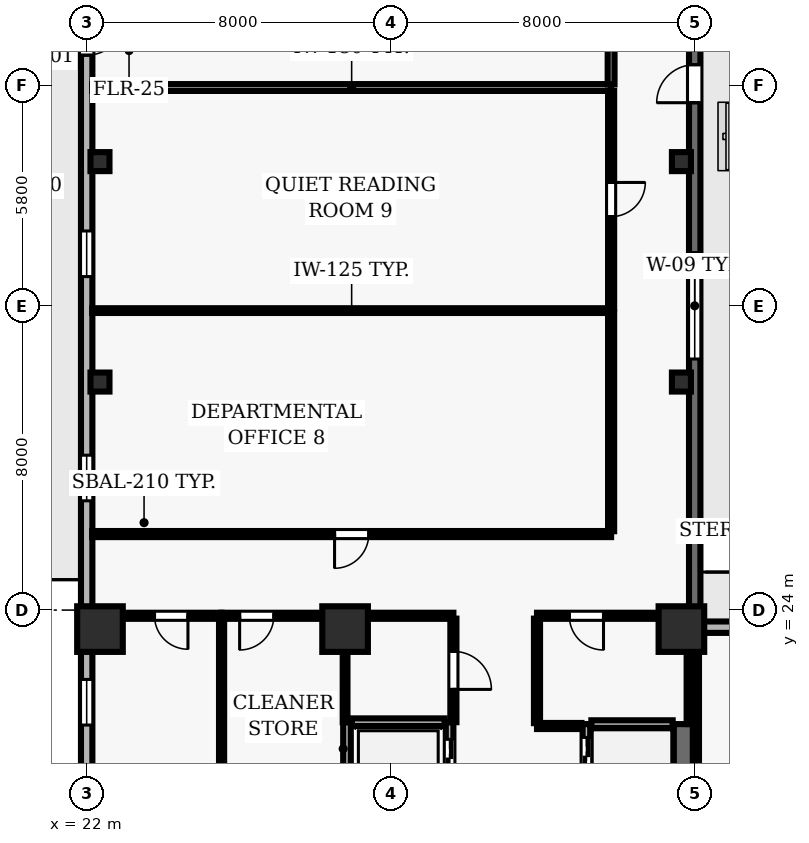
"""IFC4 building model, lengths in metres.
Left out: names, types, materials, properties, quantities, classifications, styles, units other than length and angle.
Written with IfcOpenShell. Run it as: python <this file> out.ifc"""

import sys

from ifc_helpers import new_model, si_unit, direction, frame, frame_2d, origin, origin_2d, place, context, subcontext, project, spatial, rectangle, hollow_rectangle, extrude, element, fill, save


model = new_model("IFC4")
c1 = context("Model", 3, precision=1e-05, world=origin(), true_north=direction((0.0, 1.0)))
c2 = subcontext(c1, "Body", "Model", "MODEL_VIEW")
j1 = project(units=[si_unit("LENGTHUNIT", "METRE"), si_unit("PLANEANGLEUNIT", "RADIAN")], contexts=[c1])
p1 = place(None, origin())
s1 = spatial("IfcSite", under=j1, at=p1, CompositionType="ELEMENT")
p2 = place(p1, origin())
s2 = spatial("IfcBuilding", under=s1, at=p2, CompositionType="ELEMENT")
p3 = place(p2, frame((0.0, 0.0, 150.2)))
s3 = spatial("IfcBuildingStorey", under=s2, at=p3, CompositionType="ELEMENT", Elevation=150.2)
for number, where, z_axis, x_axis in (
    (1, (22.35, 23.5, 0.0), (0.0, 0.0, 1.0), (1.0, 0.0, 0.0)),
    (2, (28.8, 23.5, 0.0), (0.0, 0.0, 1.0), (1.0, 0.0, 0.0)),
    (3, (37.65, 23.5, 0.0), (0.0, 0.0, 1.0), (1.0, 0.0, 0.0)),
):
    element("IfcColumn", number, at=place(p3, frame(where, z_axis=z_axis, x_axis=x_axis)), inside=s3, PredefinedType="COLUMN", context=c2, shape_type="SweptSolid", body=[
        extrude(rectangle(XDim=1.2, YDim=1.2, at=origin_2d()), origin(), (0.0, 0.0, 1.0), 3.9),
    ])
for number, where, z_axis, x_axis in (
    (4, (22.35, 30.0, 0.0), (0.0, 0.0, 1.0), (1.0, 0.0, 0.0)),
    (5, (37.65, 30.0, 0.0), (0.0, 0.0, 1.0), (1.0, 0.0, 0.0)),
    (6, (22.35, 35.8, 0.0), (0.0, 0.0, 1.0), (1.0, 0.0, 0.0)),
    (7, (37.65, 35.8, 0.0), (0.0, 0.0, 1.0), (1.0, 0.0, 0.0)),
):
    element("IfcColumn", number, at=place(p3, frame(where, z_axis=z_axis, x_axis=x_axis)), inside=s3, PredefinedType="COLUMN", context=c2, shape_type="SweptSolid", body=[
        extrude(hollow_rectangle(XDim=0.5, YDim=0.5, WallThickness=0.025, at=origin_2d()), origin(), (0.0, 0.0, 1.0), 3.9),
    ])
p4 = place(p3, frame((44.194, 23.55, 0.0), z_axis=(0.0, 0.0, 1.0), x_axis=(-1.0, 0.0, 0.0)))
e8 = element("IfcWall", 8, at=p4, inside=s3, PredefinedType="SOLIDWALL", context=c2, shape_type="SweptSolid", body=[
    extrude(rectangle(XDim=6.194, YDim=0.3, at=frame_2d((3.097, 0.0))), origin(), (0.0, 0.0, 1.0), 3.69),
])
p5 = place(p4, frame((2.422, 0.0, 0.0)))
e9 = element("IfcOpeningElement", 9, at=p5, cuts=e8, PredefinedType="OPENING", context=c2, shape_type="SweptSolid", body=[
    extrude(rectangle(XDim=1.35, YDim=2.2, at=frame_2d((0.675, 1.1))), frame((0.0, 0.16, 0.0), z_axis=(0.0, -1.0, 0.0), x_axis=(1.0, 0.0, 0.0)), (0.0, 0.0, 1.0), 0.32),
])
p6 = place(p3, frame((38.0, 23.55, 0.0), z_axis=(0.0, 0.0, 1.0), x_axis=(0.0, 1.0, 0.0)))
e10 = element("IfcWall", 10, at=p6, inside=s3, PredefinedType="SOLIDWALL", context=c2, shape_type="SweptSolid", body=[
    extrude(rectangle(XDim=22.55, YDim=0.3, at=frame_2d((11.275, 0.0))), origin(), (0.0, 0.0, 1.0), 3.69),
])
p7 = place(p6, frame((13.8, 0.0, 0.0)))
e11 = element("IfcOpeningElement", 11, at=p7, cuts=e10, PredefinedType="OPENING", context=c2, shape_type="SweptSolid", body=[
    extrude(rectangle(XDim=1.0, YDim=2.2, at=frame_2d((0.5, 1.1))), frame((0.0, 0.16, 0.0), z_axis=(0.0, -1.0, 0.0), x_axis=(1.0, 0.0, 0.0)), (0.0, 0.0, 1.0), 0.32),
])
p8 = place(p6, frame((7.056, 0.0, 0.9)))
e12 = element("IfcOpeningElement", 12, at=p8, cuts=e10, PredefinedType="OPENING", context=c2, shape_type="SweptSolid", body=[
    extrude(rectangle(XDim=2.8, YDim=1.8, at=frame_2d((1.4, 0.9))), frame((0.0, 0.16, 0.0), z_axis=(0.0, -1.0, 0.0), x_axis=(1.0, 0.0, 0.0)), (0.0, 0.0, 1.0), 0.32),
])
p9 = place(p6, frame((18.331, 0.0, 0.9)))
e13 = element("IfcOpeningElement", 13, at=p9, cuts=e10, PredefinedType="OPENING", context=c2, shape_type="SweptSolid", body=[
    extrude(rectangle(XDim=2.8, YDim=1.8, at=frame_2d((1.4, 0.9))), frame((0.0, 0.16, 0.0), z_axis=(0.0, -1.0, 0.0), x_axis=(1.0, 0.0, 0.0)), (0.0, 0.0, 1.0), 0.32),
])
p10 = place(p3, frame((22.0, 46.1, 0.0), z_axis=(0.0, 0.0, 1.0), x_axis=(0.0, -1.0, 0.0)))
e14 = element("IfcWall", 14, at=p10, inside=s3, PredefinedType="SOLIDWALL", context=c2, shape_type="SweptSolid", body=[
    extrude(rectangle(XDim=43.6, YDim=0.3, at=frame_2d((21.8, 0.0))), origin(), (0.0, 0.0, 1.0), 3.69),
])
p11 = place(p10, frame((6.5, 0.0, 0.0)))
e15 = element("IfcOpeningElement", 15, at=p11, cuts=e14, PredefinedType="OPENING", context=c2, shape_type="SweptSolid", body=[
    extrude(rectangle(XDim=1.0, YDim=2.2, at=frame_2d((0.5, 1.1))), frame((0.0, 0.16, 0.0), z_axis=(0.0, -1.0, 0.0), x_axis=(1.0, 0.0, 0.0)), (0.0, 0.0, 1.0), 0.32),
])
p12 = place(p10, frame((12.125, 0.0, 0.9)))
e16 = element("IfcOpeningElement", 16, at=p12, cuts=e14, PredefinedType="OPENING", context=c2, shape_type="SweptSolid", body=[
    extrude(rectangle(XDim=1.2, YDim=1.6, at=frame_2d((0.6, 0.8))), frame((0.0, 0.16, 0.0), z_axis=(0.0, -1.0, 0.0), x_axis=(1.0, 0.0, 0.0)), (0.0, 0.0, 1.0), 0.32),
])
p13 = place(p10, frame((18.025, 0.0, 0.9)))
e17 = element("IfcOpeningElement", 17, at=p13, cuts=e14, PredefinedType="OPENING", context=c2, shape_type="SweptSolid", body=[
    extrude(rectangle(XDim=1.2, YDim=1.6, at=frame_2d((0.6, 0.8))), frame((0.0, 0.16, 0.0), z_axis=(0.0, -1.0, 0.0), x_axis=(1.0, 0.0, 0.0)), (0.0, 0.0, 1.0), 0.32),
])
p14 = place(p10, frame((23.925, 0.0, 0.9)))
e18 = element("IfcOpeningElement", 18, at=p14, cuts=e14, PredefinedType="OPENING", context=c2, shape_type="SweptSolid", body=[
    extrude(rectangle(XDim=1.2, YDim=1.6, at=frame_2d((0.6, 0.8))), frame((0.0, 0.16, 0.0), z_axis=(0.0, -1.0, 0.0), x_axis=(1.0, 0.0, 0.0)), (0.0, 0.0, 1.0), 0.32),
])
p15 = place(p10, frame((29.375, 0.0, 0.9)))
e19 = element("IfcOpeningElement", 19, at=p15, cuts=e14, PredefinedType="OPENING", context=c2, shape_type="SweptSolid", body=[
    extrude(rectangle(XDim=1.2, YDim=1.6, at=frame_2d((0.6, 0.8))), frame((0.0, 0.16, 0.0), z_axis=(0.0, -1.0, 0.0), x_axis=(1.0, 0.0, 0.0)), (0.0, 0.0, 1.0), 0.32),
])
p16 = place(p10, frame((34.825, 0.0, 0.9)))
e20 = element("IfcOpeningElement", 20, at=p16, cuts=e14, PredefinedType="OPENING", context=c2, shape_type="SweptSolid", body=[
    extrude(rectangle(XDim=1.2, YDim=1.6, at=frame_2d((0.6, 0.8))), frame((0.0, 0.16, 0.0), z_axis=(0.0, -1.0, 0.0), x_axis=(1.0, 0.0, 0.0)), (0.0, 0.0, 1.0), 0.32),
])
p17 = place(p3, frame((35.15, 21.0, 0.0), z_axis=(0.0, 0.0, 1.0), x_axis=(0.0, -1.0, 0.0)))
e21 = element("IfcWall", 21, at=p17, inside=s3, PredefinedType="SOLIDWALL", context=c2, shape_type="SweptSolid", body=[
    extrude(rectangle(XDim=1.7, YDim=0.2, at=frame_2d((0.85, 0.0))), origin(), (0.0, 0.0, 1.0), 3.69),
])
p18 = place(p17, frame((0.35, 0.0, 0.0)))
e22 = element("IfcOpeningElement", 22, at=p18, cuts=e21, PredefinedType="OPENING", context=c2, shape_type="SweptSolid", body=[
    extrude(rectangle(XDim=1.0, YDim=2.1, at=frame_2d((0.5, 1.05))), frame((0.0, 0.11, 0.0), z_axis=(0.0, -1.0, 0.0), x_axis=(1.0, 0.0, 0.0)), (0.0, 0.0, 1.0), 0.22),
])
p19 = place(p3, frame((37.7, 19.3, 0.0), z_axis=(0.0, 0.0, 1.0), x_axis=(0.0, 1.0, 0.0)))
e23 = element("IfcWall", 23, at=p19, inside=s3, PredefinedType="SHEAR", context=c2, shape_type="SweptSolid", body=[
    extrude(rectangle(XDim=1.7, YDim=0.5, at=frame_2d((0.85, 0.0))), origin(), (0.0, 0.0, 1.0), 3.69),
])
p20 = place(p3, frame((37.42, 21.0, 0.0), z_axis=(0.0, 0.0, 1.0), x_axis=(-1.0, 0.0, 0.0)))
e24 = element("IfcWall", 24, at=p20, inside=s3, PredefinedType="SOLIDWALL", context=c2, shape_type="SweptSolid", body=[
    extrude(rectangle(XDim=2.14, YDim=0.2, at=frame_2d((1.07, 0.0))), origin(), (0.0, 0.0, 1.0), 3.69),
])
p21 = place(p3, frame((28.85, 21.05, 0.0), z_axis=(0.0, 0.0, 1.0), x_axis=(0.0, -1.0, 0.0)))
e25 = element("IfcWall", 25, at=p21, inside=s3, PredefinedType="SOLIDWALL", context=c2, shape_type="SweptSolid", body=[
    extrude(rectangle(XDim=1.9, YDim=0.2, at=frame_2d((0.95, 0.0))), origin(), (0.0, 0.0, 1.0), 3.69),
])
p22 = place(p3, frame((31.55, 19.15, 0.0), z_axis=(0.0, 0.0, 1.0), x_axis=(0.0, 1.0, 0.0)))
e26 = element("IfcWall", 26, at=p22, inside=s3, PredefinedType="SOLIDWALL", context=c2, shape_type="SweptSolid", body=[
    extrude(rectangle(XDim=1.9, YDim=0.2, at=frame_2d((0.95, 0.0))), origin(), (0.0, 0.0, 1.0), 3.69),
])
p23 = place(p22, frame((0.45, 0.0, 0.0)))
e27 = element("IfcOpeningElement", 27, at=p23, cuts=e26, PredefinedType="OPENING", context=c2, shape_type="SweptSolid", body=[
    extrude(rectangle(XDim=1.0, YDim=2.1, at=frame_2d((0.5, 1.05))), frame((0.0, 0.11, 0.0), z_axis=(0.0, -1.0, 0.0), x_axis=(1.0, 0.0, 0.0)), (0.0, 0.0, 1.0), 0.22),
])
p24 = place(p3, frame((31.42, 21.05, 0.0), z_axis=(0.0, 0.0, 1.0), x_axis=(-1.0, 0.0, 0.0)))
e28 = element("IfcWall", 28, at=p24, inside=s3, PredefinedType="SOLIDWALL", context=c2, shape_type="SweptSolid", body=[
    extrude(rectangle(XDim=2.44, YDim=0.2, at=frame_2d((1.22, 0.0))), origin(), (0.0, 0.0, 1.0), 3.69),
])
p25 = place(p3, frame((25.55, 23.85, 0.0), z_axis=(0.0, 0.0, 1.0), x_axis=(-1.0, 0.0, 0.0)))
e29 = element("IfcWall", 29, at=p25, inside=s3, PredefinedType="PARTITIONING", context=c2, shape_type="SweptSolid", body=[
    extrude(rectangle(XDim=3.35, YDim=0.16, at=frame_2d((1.675, 0.0))), origin(), (0.0, 0.0, 1.0), 3.074),
])
p26 = place(p25, frame((0.885, 0.0, 0.0)))
e30 = element("IfcOpeningElement", 30, at=p26, cuts=e29, PredefinedType="OPENING", context=c2, shape_type="SweptSolid", body=[
    extrude(rectangle(XDim=0.88, YDim=2.1, at=frame_2d((0.44, 1.05))), frame((0.0, 0.09, 0.0), z_axis=(0.0, -1.0, 0.0), x_axis=(1.0, 0.0, 0.0)), (0.0, 0.0, 1.0), 0.18),
])
p27 = place(p3, frame((28.8, 23.85, 0.0), z_axis=(0.0, 0.0, 1.0), x_axis=(-1.0, 0.0, 0.0)))
e31 = element("IfcWall", 31, at=p27, inside=s3, PredefinedType="PARTITIONING", context=c2, shape_type="SweptSolid", body=[
    extrude(rectangle(XDim=3.25, YDim=0.16, at=frame_2d((1.625, 0.0))), origin(), (0.0, 0.0, 1.0), 3.074),
])
p28 = place(p27, frame((1.875, 0.0, 0.0)))
e32 = element("IfcOpeningElement", 32, at=p28, cuts=e31, PredefinedType="OPENING", context=c2, shape_type="SweptSolid", body=[
    extrude(rectangle(XDim=0.9, YDim=2.1, at=frame_2d((0.45, 1.05))), frame((0.0, 0.09, 0.0), z_axis=(0.0, -1.0, 0.0), x_axis=(1.0, 0.0, 0.0)), (0.0, 0.0, 1.0), 0.18),
])
p29 = place(p3, frame((31.65, 23.85, 0.0), z_axis=(0.0, 0.0, 1.0), x_axis=(-1.0, 0.0, 0.0)))
e33 = element("IfcWall", 33, at=p29, inside=s3, PredefinedType="PARTITIONING", context=c2, shape_type="SweptSolid", body=[
    extrude(rectangle(XDim=2.85, YDim=0.16, at=frame_2d((1.425, 0.0))), origin(), (0.0, 0.0, 1.0), 3.074),
])
p30 = place(p3, frame((35.02, 20.95, 0.0), z_axis=(0.0, 0.0, 1.0), x_axis=(-1.0, 0.0, 0.0)))
e34 = element("IfcWall", 34, at=p30, inside=s3, PredefinedType="PARTITIONING", context=c2, shape_type="SweptSolid", body=[
    extrude(rectangle(XDim=1.17, YDim=0.16, at=frame_2d((0.585, 0.0))), origin(), (0.0, 0.0, 1.0), 3.69),
])
p31 = place(p3, frame((35.8, 26.0, 0.0), z_axis=(0.0, 0.0, 1.0), x_axis=(-1.0, 0.0, 0.0)))
e35 = element("IfcWall", 35, at=p31, inside=s3, PredefinedType="PARTITIONING", context=c2, shape_type="SweptSolid", body=[
    extrude(rectangle(XDim=13.655, YDim=0.16, at=frame_2d((6.828, 0.0))), origin(), (0.0, 0.0, 1.0), 3.69),
])
p32 = place(p31, frame((6.377, 0.0, 0.0)))
e36 = element("IfcOpeningElement", 36, at=p32, cuts=e35, PredefinedType="OPENING", context=c2, shape_type="SweptSolid", body=[
    extrude(rectangle(XDim=0.9, YDim=2.1, at=frame_2d((0.45, 1.05))), frame((0.0, 0.09, 0.0), z_axis=(0.0, -1.0, 0.0), x_axis=(1.0, 0.0, 0.0)), (0.0, 0.0, 1.0), 0.18),
])
p33 = place(p3, frame((35.8, 31.88, 0.0), z_axis=(0.0, 0.0, 1.0), x_axis=(-1.0, 0.0, 0.0)))
e37 = element("IfcWall", 37, at=p33, inside=s3, PredefinedType="PARTITIONING", context=c2, shape_type="SweptSolid", body=[
    extrude(rectangle(XDim=13.655, YDim=0.125, at=frame_2d((6.828, 0.0))), origin(), (0.0, 0.0, 1.0), 3.69),
])
p34 = place(p3, frame((35.8, 37.75, 0.0), z_axis=(0.0, 0.0, 1.0), x_axis=(-1.0, 0.0, 0.0)))
e38 = element("IfcWall", 38, at=p34, inside=s3, PredefinedType="PARTITIONING", context=c2, shape_type="SweptSolid", body=[
    extrude(rectangle(XDim=13.655, YDim=0.18, at=frame_2d((6.828, 0.0))), origin(), (0.0, 0.0, 1.0), 3.69),
])
p35 = place(p3, frame((37.85, 23.85, 0.0), z_axis=(0.0, 0.0, 1.0), x_axis=(-1.0, 0.0, 0.0)))
e39 = element("IfcWall", 39, at=p35, inside=s3, PredefinedType="PARTITIONING", context=c2, shape_type="SweptSolid", body=[
    extrude(rectangle(XDim=4.0, YDim=0.16, at=frame_2d((2.0, 0.0))), origin(), (0.0, 0.0, 1.0), 3.074),
])
p36 = place(p35, frame((2.25, 0.0, 0.0)))
e40 = element("IfcOpeningElement", 40, at=p36, cuts=e39, PredefinedType="OPENING", context=c2, shape_type="SweptSolid", body=[
    extrude(rectangle(XDim=0.9, YDim=2.1, at=frame_2d((0.45, 1.05))), frame((0.0, 0.09, 0.0), z_axis=(0.0, -1.0, 0.0), x_axis=(1.0, 0.0, 0.0)), (0.0, 0.0, 1.0), 0.18),
])
p37 = place(p3, frame((25.55, 19.16, 0.0), z_axis=(0.0, 0.0, 1.0), x_axis=(0.0, 1.0, 0.0)))
e41 = element("IfcWall", 41, at=p37, inside=s3, PredefinedType="PARTITIONING", context=c2, shape_type="SweptSolid", body=[
    extrude(rectangle(XDim=4.615, YDim=0.135, at=frame_2d((2.308, 0.0))), origin(), (0.0, 0.0, 1.0), 3.69),
])
p38 = place(p3, frame((28.8, 23.775, 0.0), z_axis=(0.0, 0.0, 1.0), x_axis=(0.0, -1.0, 0.0)))
e42 = element("IfcWall", 42, at=p38, inside=s3, PredefinedType="PARTITIONING", context=c2, shape_type="SweptSolid", body=[
    extrude(rectangle(XDim=2.725, YDim=0.125, at=frame_2d((1.362, 0.0))), origin(), (0.0, 0.0, 1.0), 3.69),
])
p39 = place(p3, frame((31.65, 23.775, 0.0), z_axis=(0.0, 0.0, 1.0), x_axis=(0.0, -1.0, 0.0)))
e43 = element("IfcWall", 43, at=p39, inside=s3, PredefinedType="PARTITIONING", context=c2, shape_type="SweptSolid", body=[
    extrude(rectangle(XDim=2.725, YDim=0.16, at=frame_2d((1.362, 0.0))), origin(), (0.0, 0.0, 1.0), 3.69),
])
p40 = place(p39, frame((0.862, 0.0, 0.0)))
e44 = element("IfcOpeningElement", 44, at=p40, cuts=e43, PredefinedType="OPENING", context=c2, shape_type="SweptSolid", body=[
    extrude(rectangle(XDim=1.0, YDim=2.1, at=frame_2d((0.5, 1.05))), frame((0.0, 0.09, 0.0), z_axis=(0.0, -1.0, 0.0), x_axis=(1.0, 0.0, 0.0)), (0.0, 0.0, 1.0), 0.18),
])
p41 = place(p3, frame((33.85, 21.025, 0.0), z_axis=(0.0, 0.0, 1.0), x_axis=(0.0, 1.0, 0.0)))
e45 = element("IfcWall", 45, at=p41, inside=s3, PredefinedType="PARTITIONING", context=c2, shape_type="SweptSolid", body=[
    extrude(rectangle(XDim=2.75, YDim=0.16, at=frame_2d((1.375, 0.0))), origin(), (0.0, 0.0, 1.0), 3.69),
])
p42 = place(p3, frame((35.8, 31.822, 0.0), z_axis=(0.0, 0.0, 1.0), x_axis=(0.0, -1.0, 0.0)))
e46 = element("IfcWall", 46, at=p42, inside=s3, PredefinedType="PARTITIONING", context=c2, shape_type="SweptSolid", body=[
    extrude(rectangle(XDim=5.747, YDim=0.16, at=frame_2d((2.874, 0.0))), origin(), (0.0, 0.0, 1.0), 3.69),
])
p43 = place(p3, frame((35.8, 37.665, 0.0), z_axis=(0.0, 0.0, 1.0), x_axis=(0.0, -1.0, 0.0)))
e47 = element("IfcWall", 47, at=p43, inside=s3, PredefinedType="PARTITIONING", context=c2, shape_type="SweptSolid", body=[
    extrude(rectangle(XDim=5.727, YDim=0.16, at=frame_2d((2.864, 0.0))), origin(), (0.0, 0.0, 1.0), 3.69),
])
p44 = place(p43, frame((2.413, 0.0, 0.0)))
e48 = element("IfcOpeningElement", 48, at=p44, cuts=e47, PredefinedType="OPENING", context=c2, shape_type="SweptSolid", body=[
    extrude(rectangle(XDim=0.9, YDim=2.1, at=frame_2d((0.45, 1.05))), frame((0.0, 0.09, 0.0), z_axis=(0.0, -1.0, 0.0), x_axis=(1.0, 0.0, 0.0)), (0.0, 0.0, 1.0), 0.18),
])
p45 = place(p3, frame((35.8, 43.095, 0.0), z_axis=(0.0, 0.0, 1.0), x_axis=(0.0, -1.0, 0.0)))
e49 = element("IfcWall", 49, at=p45, inside=s3, PredefinedType="PARTITIONING", context=c2, shape_type="SweptSolid", body=[
    extrude(rectangle(XDim=5.26, YDim=0.18, at=frame_2d((2.63, 0.0))), origin(), (0.0, 0.0, 1.0), 3.69),
])
p46 = place(p45, frame((2.155, 0.0, 0.0)))
e50 = element("IfcOpeningElement", 50, at=p46, cuts=e49, PredefinedType="OPENING", context=c2, shape_type="SweptSolid", body=[
    extrude(rectangle(XDim=0.95, YDim=2.1, at=frame_2d((0.475, 1.05))), frame((0.0, 0.1, 0.0), z_axis=(0.0, -1.0, 0.0), x_axis=(1.0, 0.0, 0.0)), (0.0, 0.0, 1.0), 0.2),
])
p47 = place(p3, frame((37.85, 21.0, 0.0), z_axis=(0.0, 0.0, 1.0), x_axis=(0.0, 1.0, 0.0)))
e51 = element("IfcWall", 51, at=p47, inside=s3, PredefinedType="PARTITIONING", context=c2, shape_type="SweptSolid", body=[
    extrude(rectangle(XDim=2.55, YDim=0.125, at=frame_2d((1.275, 0.0))), origin(), (0.0, 0.0, 1.0), 3.074),
])
p48 = place(p3, frame((38.05, 23.405, 0.0), z_axis=(0.0, 0.0, 1.0), x_axis=(0.0, -1.0, 0.0)))
e52 = element("IfcWall", 52, at=p48, inside=s3, PredefinedType="PARTITIONING", context=c2, shape_type="SweptSolid", body=[
    extrude(rectangle(XDim=7.33, YDim=0.125, at=frame_2d((3.665, 0.0))), origin(), (0.0, 0.0, 1.0), 3.074),
])
p49 = place(p7, origin())
e53 = element("IfcDoor", 53, at=p49, inside=s3, OperationType="SINGLE_SWING_LEFT", PredefinedType="DOOR", context=c2, shape_type="SweptSolid", body=[
    extrude(rectangle(XDim=1.0, YDim=2.2, at=frame_2d((0.5, 1.1))), frame((0.0, 0.025, 0.0), z_axis=(0.0, -1.0, 0.0), x_axis=(1.0, 0.0, 0.0)), (0.0, 0.0, 1.0), 0.05),
])
fill(e11, e53)
p50 = place(p8, origin())
e54 = element("IfcWindow", 54, at=p50, inside=s3, PartitioningType="SINGLE_PANEL", PredefinedType="WINDOW", context=c2, shape_type="SweptSolid", body=[
    extrude(rectangle(XDim=2.8, YDim=1.8, at=frame_2d((1.4, 0.9))), frame((0.0, 0.03, 0.0), z_axis=(0.0, -1.0, 0.0), x_axis=(1.0, 0.0, 0.0)), (0.0, 0.0, 1.0), 0.06),
])
fill(e12, e54)
p51 = place(p11, origin())
e55 = element("IfcDoor", 55, at=p51, inside=s3, OperationType="SINGLE_SWING_LEFT", PredefinedType="DOOR", context=c2, shape_type="SweptSolid", body=[
    extrude(rectangle(XDim=1.0, YDim=2.2, at=frame_2d((0.5, 1.1))), frame((0.0, 0.025, 0.0), z_axis=(0.0, -1.0, 0.0), x_axis=(1.0, 0.0, 0.0)), (0.0, 0.0, 1.0), 0.05),
])
fill(e15, e55)
p52 = place(p12, origin())
e56 = element("IfcWindow", 56, at=p52, inside=s3, PartitioningType="SINGLE_PANEL", PredefinedType="WINDOW", context=c2, shape_type="SweptSolid", body=[
    extrude(rectangle(XDim=1.2, YDim=1.6, at=frame_2d((0.6, 0.8))), frame((0.0, 0.03, 0.0), z_axis=(0.0, -1.0, 0.0), x_axis=(1.0, 0.0, 0.0)), (0.0, 0.0, 1.0), 0.06),
])
fill(e16, e56)
p53 = place(p13, origin())
e57 = element("IfcWindow", 57, at=p53, inside=s3, PartitioningType="SINGLE_PANEL", PredefinedType="WINDOW", context=c2, shape_type="SweptSolid", body=[
    extrude(rectangle(XDim=1.2, YDim=1.6, at=frame_2d((0.6, 0.8))), frame((0.0, 0.03, 0.0), z_axis=(0.0, -1.0, 0.0), x_axis=(1.0, 0.0, 0.0)), (0.0, 0.0, 1.0), 0.06),
])
fill(e17, e57)
p54 = place(p14, origin())
e58 = element("IfcWindow", 58, at=p54, inside=s3, PartitioningType="SINGLE_PANEL", PredefinedType="WINDOW", context=c2, shape_type="SweptSolid", body=[
    extrude(rectangle(XDim=1.2, YDim=1.6, at=frame_2d((0.6, 0.8))), frame((0.0, 0.03, 0.0), z_axis=(0.0, -1.0, 0.0), x_axis=(1.0, 0.0, 0.0)), (0.0, 0.0, 1.0), 0.06),
])
fill(e18, e58)
p55 = place(p18, origin())
e59 = element("IfcDoor", 59, at=p55, inside=s3, OperationType="DOUBLE_DOOR_SLIDING", PredefinedType="DOOR", context=c2, shape_type="SweptSolid", body=[
    extrude(rectangle(XDim=1.0, YDim=2.1, at=frame_2d((0.5, 1.05))), frame((0.0, 0.025, 0.0), z_axis=(0.0, -1.0, 0.0), x_axis=(1.0, 0.0, 0.0)), (0.0, 0.0, 1.0), 0.05),
])
fill(e22, e59)
p56 = place(p23, origin())
e60 = element("IfcDoor", 60, at=p56, inside=s3, OperationType="DOUBLE_DOOR_SLIDING", PredefinedType="DOOR", context=c2, shape_type="SweptSolid", body=[
    extrude(rectangle(XDim=1.0, YDim=2.1, at=frame_2d((0.5, 1.05))), frame((0.0, 0.025, 0.0), z_axis=(0.0, -1.0, 0.0), x_axis=(1.0, 0.0, 0.0)), (0.0, 0.0, 1.0), 0.05),
])
fill(e27, e60)
p57 = place(p36, origin())
e61 = element("IfcDoor", 61, at=p57, inside=s3, OperationType="SINGLE_SWING_LEFT", PredefinedType="DOOR", context=c2, shape_type="SweptSolid", body=[
    extrude(rectangle(XDim=0.9, YDim=2.1, at=frame_2d((0.45, 1.05))), frame((0.0, 0.025, 0.0), z_axis=(0.0, -1.0, 0.0), x_axis=(1.0, 0.0, 0.0)), (0.0, 0.0, 1.0), 0.05),
])
fill(e40, e61)
p58 = place(p40, origin())
e62 = element("IfcDoor", 62, at=p58, inside=s3, OperationType="SINGLE_SWING_RIGHT", PredefinedType="DOOR", context=c2, shape_type="SweptSolid", body=[
    extrude(rectangle(XDim=1.0, YDim=2.1, at=frame_2d((0.5, 1.05))), frame((0.0, 0.025, 0.0), z_axis=(0.0, -1.0, 0.0), x_axis=(1.0, 0.0, 0.0)), (0.0, 0.0, 1.0), 0.05),
])
fill(e44, e62)
p59 = place(p26, origin())
e63 = element("IfcDoor", 63, at=p59, inside=s3, OperationType="SINGLE_SWING_LEFT", PredefinedType="DOOR", context=c2, shape_type="SweptSolid", body=[
    extrude(rectangle(XDim=0.88, YDim=2.1, at=frame_2d((0.44, 1.05))), frame((0.0, 0.025, 0.0), z_axis=(0.0, -1.0, 0.0), x_axis=(1.0, 0.0, 0.0)), (0.0, 0.0, 1.0), 0.05),
])
fill(e30, e63)
p60 = place(p28, origin())
e64 = element("IfcDoor", 64, at=p60, inside=s3, OperationType="SINGLE_SWING_RIGHT", PredefinedType="DOOR", context=c2, shape_type="SweptSolid", body=[
    extrude(rectangle(XDim=0.9, YDim=2.1, at=frame_2d((0.45, 1.05))), frame((0.0, 0.025, 0.0), z_axis=(0.0, -1.0, 0.0), x_axis=(1.0, 0.0, 0.0)), (0.0, 0.0, 1.0), 0.05),
])
fill(e32, e64)
p61 = place(p32, origin())
e65 = element("IfcDoor", 65, at=p61, inside=s3, OperationType="SINGLE_SWING_RIGHT", PredefinedType="DOOR", context=c2, shape_type="SweptSolid", body=[
    extrude(rectangle(XDim=0.9, YDim=2.1, at=frame_2d((0.45, 1.05))), frame((0.0, 0.025, 0.0), z_axis=(0.0, -1.0, 0.0), x_axis=(1.0, 0.0, 0.0)), (0.0, 0.0, 1.0), 0.05),
])
fill(e36, e65)
p62 = place(p44, origin())
e66 = element("IfcDoor", 66, at=p62, inside=s3, OperationType="SINGLE_SWING_LEFT", PredefinedType="DOOR", context=c2, shape_type="SweptSolid", body=[
    extrude(rectangle(XDim=0.9, YDim=2.1, at=frame_2d((0.45, 1.05))), frame((0.0, 0.025, 0.0), z_axis=(0.0, -1.0, 0.0), x_axis=(1.0, 0.0, 0.0)), (0.0, 0.0, 1.0), 0.05),
])
fill(e48, e66)
save(model, sys.argv[1])
